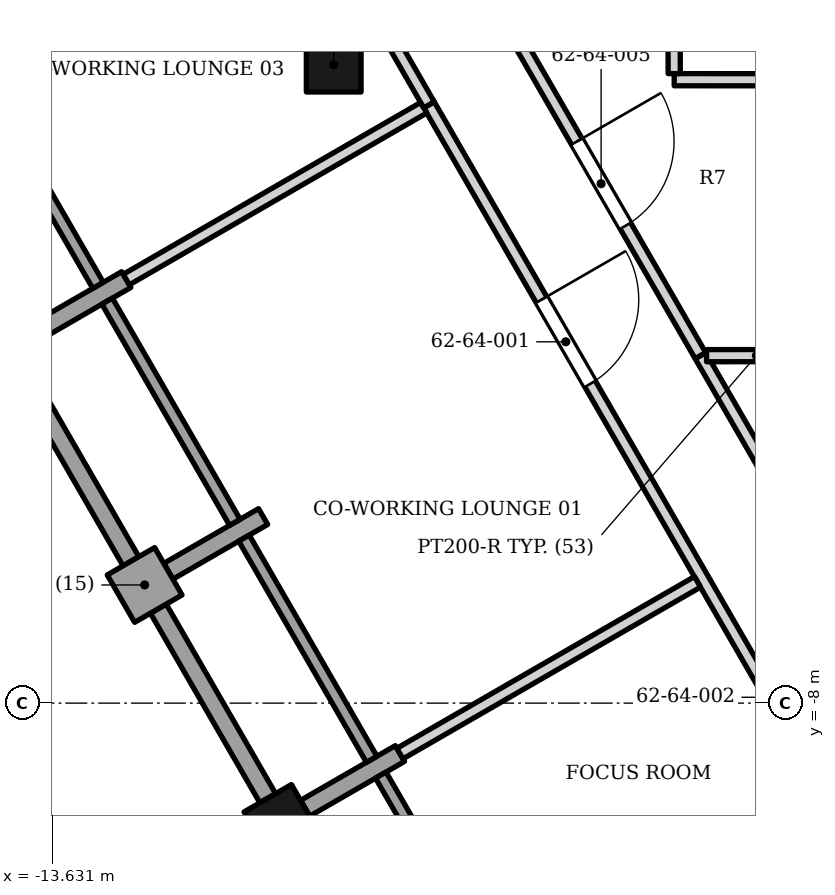
"""IFC4 building model, lengths in metres.
Left out: names, types, materials, properties, quantities, classifications, styles, units other than length and angle.
Written with IfcOpenShell. Run it as: python <this file> out.ifc"""

import sys

from ifc_helpers import new_model, si_unit, direction, frame, frame_2d, origin, origin_2d, place, context, subcontext, project, spatial, rectangle, extrude, element, fill, save


model = new_model("IFC4")
c1 = context("Model", 3, precision=1e-05, world=origin(), true_north=direction((0.0, 1.0)))
c2 = subcontext(c1, "Body", "Model", "MODEL_VIEW")
j1 = project(units=[si_unit("LENGTHUNIT", "METRE"), si_unit("PLANEANGLEUNIT", "RADIAN")], contexts=[c1])
p1 = place(None, origin())
s1 = spatial("IfcSite", under=j1, at=p1, CompositionType="ELEMENT")
p2 = place(p1, origin())
s2 = spatial("IfcBuilding", under=s1, at=p2, CompositionType="ELEMENT")
p3 = place(p2, frame((0.0, 0.0, 259.9)))
s3 = spatial("IfcBuildingStorey", under=s2, at=p3, CompositionType="ELEMENT", Elevation=259.9)
for number, where, z_axis, x_axis in (
    (1, (-9.0, 2.5, 0.0), (0.0, 0.0, 1.0), (1.0, 0.0, 0.0)),
    (2, (-9.86, -9.954, 0.0), (0.0, 0.0, 1.0), (0.5, -0.866, 0.0)),
):
    element("IfcColumn", number, at=place(p3, frame(where, z_axis=z_axis, x_axis=x_axis)), inside=s3, PredefinedType="COLUMN", context=c2, shape_type="SweptSolid", body=[
        extrude(rectangle(XDim=0.9, YDim=0.9, at=origin_2d()), origin(), (0.0, 0.0, 1.0), 3.9),
    ])
p4 = place(p3, frame((-12.411, -1.035, 0.0), z_axis=(0.0, 0.0, 1.0), x_axis=(-0.866047807691, -0.499961193289, 0.0)))
e3 = element("IfcWall", 3, at=p4, inside=s3, PredefinedType="SOLIDWALL", context=c2, shape_type="SweptSolid", body=[
    extrude(rectangle(XDim=1.8, YDim=0.3, at=frame_2d((0.9, 0.0))), origin(), (0.0, 0.0, 1.0), 3.0),
])
p5 = place(p3, frame((-12.499, -6.282, 0.0), z_axis=(0.0, 0.0, 1.0), x_axis=(0.866081705922, 0.499902469156, 0.0)))
e4 = element("IfcWall", 4, at=p5, inside=s3, PredefinedType="SOLIDWALL", context=c2, shape_type="SweptSolid", body=[
    extrude(rectangle(XDim=0.9, YDim=0.9, at=frame_2d((0.45, 0.0))), origin(), (0.0, 0.0, 1.0), 3.0),
])
for number, where, z_axis, x_axis in (
    (5, (-11.72, -5.832, 0.0), (0.0, 0.0, 1.0), (0.866, 0.5, 0.0)),
    (6, (-7.911, -8.829, 0.0), (0.0, 0.0, 1.0), (-0.866, -0.5, 0.0)),
):
    element("IfcWall", number, at=place(p3, frame(where, z_axis=z_axis, x_axis=x_axis)), inside=s3, PredefinedType="SOLIDWALL", context=c2, shape_type="SweptSolid", body=[
        extrude(rectangle(XDim=1.8, YDim=0.3, at=frame_2d((0.9, 0.0))), origin(), (0.0, 0.0, 1.0), 3.0),
    ])
p6 = place(p3, frame((-14.976, 2.507, 0.0), z_axis=(0.0, 0.0, 1.0), x_axis=(0.49998411664, -0.866034573852, 0.0)))
e7 = element("IfcWall", 7, at=p6, inside=s3, PredefinedType="ELEMENTEDWALL", context=c2, shape_type="SweptSolid", body=[
    extrude(rectangle(XDim=4.2, YDim=0.2, at=frame_2d((2.1, 0.0))), origin(), (0.0, 0.0, 1.0), 3.0),
])
p7 = place(p3, frame((-14.135, -2.55, 0.0), z_axis=(0.0, 0.0, 1.0), x_axis=(0.500012057535, -0.866018442252, 0.0)))
e8 = element("IfcWall", 8, at=p7, inside=s3, PredefinedType="SOLIDWALL", context=c2, shape_type="SweptSolid", body=[
    extrude(rectangle(XDim=3.6, YDim=0.3, at=frame_2d((1.8, 0.0))), origin(), (0.0, 0.0, 1.0), 3.0),
])
p8 = place(p3, frame((-12.726, -1.39, 0.0), z_axis=(0.0, 0.0, 1.0), x_axis=(0.49998411664, -0.866034573852, 0.0)))
e9 = element("IfcWall", 9, at=p8, inside=s3, PredefinedType="ELEMENTEDWALL", context=c2, shape_type="SweptSolid", body=[
    extrude(rectangle(XDim=4.2, YDim=0.2, at=frame_2d((2.1, 0.0))), origin(), (0.0, 0.0, 1.0), 3.0),
])
p9 = place(p3, frame((-11.885, -6.447, 0.0), z_axis=(0.0, 0.0, 1.0), x_axis=(0.500012057535, -0.866018442252, 0.0)))
e10 = element("IfcWall", 10, at=p9, inside=s3, PredefinedType="SOLIDWALL", context=c2, shape_type="SweptSolid", body=[
    extrude(rectangle(XDim=3.6, YDim=0.3, at=frame_2d((1.8, 0.0))), origin(), (0.0, 0.0, 1.0), 3.0),
])
p10 = place(p3, frame((-10.476, -5.287, 0.0), z_axis=(0.0, 0.0, 1.0), x_axis=(0.49998411664, -0.866034573852, 0.0)))
e11 = element("IfcWall", 11, at=p10, inside=s3, PredefinedType="ELEMENTEDWALL", context=c2, shape_type="SweptSolid", body=[
    extrude(rectangle(XDim=4.2, YDim=0.2, at=frame_2d((2.1, 0.0))), origin(), (0.0, 0.0, 1.0), 3.0),
])
p11 = place(p3, frame((-8.226, -9.184, 0.0), z_axis=(0.0, 0.0, 1.0), x_axis=(0.49998411664, -0.866034573852, 0.0)))
e12 = element("IfcWall", 12, at=p11, inside=s3, PredefinedType="ELEMENTEDWALL", context=c2, shape_type="SweptSolid", body=[
    extrude(rectangle(XDim=4.2, YDim=0.2, at=frame_2d((2.1, 0.0))), origin(), (0.0, 0.0, 1.0), 2.95),
])
p12 = place(p3, frame((-5.661, -12.727, 0.0), z_axis=(0.0, 0.0, 1.0), x_axis=(0.866171915947, 0.499746147583, 0.0)))
e13 = element("IfcWall", 13, at=p12, inside=s3, PredefinedType="PARTITIONING", context=c2, shape_type="SweptSolid", body=[
    extrude(rectangle(XDim=5.649, YDim=0.2, at=frame_2d((2.825, 0.0))), origin(), (0.0, 0.0, 1.0), 2.884),
])
p13 = place(p3, frame((-7.433, 1.839, 0.0), z_axis=(0.0, 0.0, 1.0), x_axis=(0.500005992518, -0.866021943975, 0.0)))
e14 = element("IfcWall", 14, at=p13, inside=s3, PredefinedType="PARTITIONING", context=c2, shape_type="SweptSolid", body=[
    extrude(rectangle(XDim=13.764, YDim=0.2, at=frame_2d((6.882, 0.0))), origin(), (0.0, 0.0, 1.0), 2.884),
])
p14 = place(p13, frame((3.7, 0.0, 0.0)))
e15 = element("IfcOpeningElement", 15, at=p14, cuts=e14, PredefinedType="OPENING", context=c2, shape_type="SweptSolid", body=[
    extrude(rectangle(XDim=1.6, YDim=2.1, at=frame_2d((0.8, 1.05))), frame((0.0, 0.11, 0.0), z_axis=(0.0, -1.0, 0.0), x_axis=(1.0, 0.0, 0.0)), (0.0, 0.0, 1.0), 0.22),
])
p15 = place(p13, frame((10.85, 0.0, 0.0)))
e16 = element("IfcOpeningElement", 16, at=p15, cuts=e14, PredefinedType="OPENING", context=c2, shape_type="SweptSolid", body=[
    extrude(rectangle(XDim=0.8, YDim=2.1, at=frame_2d((0.4, 1.05))), frame((0.0, 0.11, 0.0), z_axis=(0.0, -1.0, 0.0), x_axis=(1.0, 0.0, 0.0)), (0.0, 0.0, 1.0), 0.22),
])
p16 = place(p3, frame((-7.911, -8.829, 0.0), z_axis=(0.0, 0.0, 1.0), x_axis=(0.866174794958, 0.49974115758, 0.0)))
e17 = element("IfcWall", 17, at=p16, inside=s3, PredefinedType="PARTITIONING", context=c2, shape_type="SweptSolid", body=[
    extrude(rectangle(XDim=5.65, YDim=0.2, at=frame_2d((2.825, 0.0))), origin(), (0.0, 0.0, 1.0), 2.884),
])
p17 = place(p3, frame((-2.968, -2.287, 0.0), z_axis=(0.0, 0.0, 1.0), x_axis=(0.499996582779, -0.866027376709, 0.0)))
e18 = element("IfcWall", 18, at=p17, inside=s3, PredefinedType="PARTITIONING", context=c2, shape_type="SweptSolid", body=[
    extrude(rectangle(XDim=5.602, YDim=0.2, at=frame_2d((2.801, 0.0))), origin(), (0.0, 0.0, 1.0), 2.884),
])
p18 = place(p3, frame((-2.868, -2.286, 0.0), z_axis=(0.0, 0.0, 1.0), x_axis=(0.999999601047, 0.000893255561, 0.0)))
e19 = element("IfcWall", 19, at=p18, inside=s3, PredefinedType="PARTITIONING", context=c2, shape_type="SweptSolid", body=[
    extrude(rectangle(XDim=1.64, YDim=0.2, at=frame_2d((0.82, 0.0))), origin(), (0.0, 0.0, 1.0), 3.73),
])
p19 = place(p3, frame((-12.411, -1.034, 0.0), z_axis=(0.0, 0.0, 1.0), x_axis=(0.865901262238, 0.500214957848, 0.0)))
e20 = element("IfcWall", 20, at=p19, inside=s3, PredefinedType="PARTITIONING", context=c2, shape_type="SweptSolid", body=[
    extrude(rectangle(XDim=5.649, YDim=0.2, at=frame_2d((2.825, 0.0))), origin(), (0.0, 0.0, 1.0), 3.052),
])
p20 = place(p3, frame((-8.417, 3.546, 0.0), z_axis=(0.0, 0.0, 1.0), x_axis=(0.499325430766, -0.866414516378, 0.0)))
e21 = element("IfcWall", 21, at=p20, inside=s3, PredefinedType="PARTITIONING", context=c2, shape_type="SweptSolid", body=[
    extrude(rectangle(XDim=1.97, YDim=0.2, at=frame_2d((0.985, 0.0))), origin(), (0.0, 0.0, 1.0), 3.73),
])
p21 = place(p3, frame((-3.4, 2.252, 0.0), z_axis=(0.0, 0.0, 1.0), x_axis=(0.999999630572, -0.000859567749, 0.0)))
e22 = element("IfcWall", 22, at=p21, inside=s3, PredefinedType="PARTITIONING", context=c2, shape_type="SweptSolid", body=[
    extrude(rectangle(XDim=2.272, YDim=0.2, at=frame_2d((1.136, 0.0))), origin(), (0.0, 0.0, 1.0), 3.73),
])
p22 = place(p3, frame((-3.402, 4.051, 0.0), z_axis=(0.0, 0.0, 1.0), x_axis=(0.001150085496, -0.999999338651, 0.0)))
e23 = element("IfcWall", 23, at=p22, inside=s3, PredefinedType="PARTITIONING", context=c2, shape_type="SweptSolid", body=[
    extrude(rectangle(XDim=1.698, YDim=0.2, at=frame_2d((0.849, 0.0))), origin(), (0.0, 0.0, 1.0), 3.73),
])
p23 = place(p3, frame((-6.236, 3.37, 0.0), z_axis=(0.0, 0.0, 1.0), x_axis=(0.500224030226, -0.865896021231, 0.0)))
e24 = element("IfcWall", 24, at=p23, inside=s3, PredefinedType="PARTITIONING", context=c2, shape_type="SweptSolid", body=[
    extrude(rectangle(XDim=6.53, YDim=0.2, at=frame_2d((3.265, 0.0))), origin(), (0.0, 0.0, 1.0), 2.884),
])
p24 = place(p23, frame((2.466, 0.0, 0.0)))
e25 = element("IfcOpeningElement", 25, at=p24, cuts=e24, PredefinedType="OPENING", context=c2, shape_type="SweptSolid", body=[
    extrude(rectangle(XDim=1.6, YDim=2.1, at=frame_2d((0.8, 1.05))), frame((0.0, 0.11, 0.0), z_axis=(0.0, -1.0, 0.0), x_axis=(1.0, 0.0, 0.0)), (0.0, 0.0, 1.0), 0.22),
])
p25 = place(p14, origin())
e26 = element("IfcDoor", 26, at=p25, inside=s3, OperationType="DOUBLE_DOOR_SINGLE_SWING", PredefinedType="DOOR", context=c2, shape_type="SweptSolid", body=[
    extrude(rectangle(XDim=1.6, YDim=2.1, at=frame_2d((0.8, 1.05))), frame((0.0, 0.025, 0.0), z_axis=(0.0, -1.0, 0.0), x_axis=(1.0, 0.0, 0.0)), (0.0, 0.0, 1.0), 0.05),
])
fill(e15, e26)
p26 = place(p24, origin())
e27 = element("IfcDoor", 27, at=p26, inside=s3, OperationType="DOUBLE_DOOR_SINGLE_SWING", PredefinedType="DOOR", context=c2, shape_type="SweptSolid", body=[
    extrude(rectangle(XDim=1.6, YDim=2.1, at=frame_2d((0.8, 1.05))), frame((0.0, 0.025, 0.0), z_axis=(0.0, -1.0, 0.0), x_axis=(1.0, 0.0, 0.0)), (0.0, 0.0, 1.0), 0.05),
])
fill(e25, e27)
save(model, sys.argv[1])
